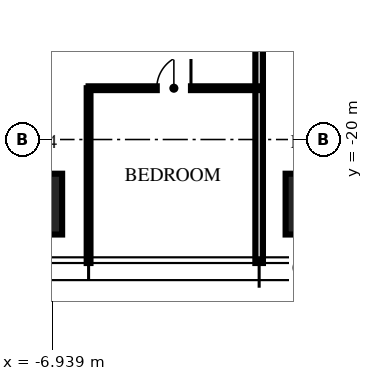
"""IFC4 building model, lengths in metres.
Left out: names, types, materials, properties, quantities, classifications, styles, units other than length and angle.
Written with IfcOpenShell. Run it as: python <this file> out.ifc"""

import sys

from ifc_helpers import new_model, si_unit, direction, frame, frame_2d, origin, origin_2d, place, context, subcontext, project, spatial, rectangle, extrude, element, fill, save


model = new_model("IFC4")
c1 = context("Model", 3, precision=1e-05, world=origin(), true_north=direction((0.0, 1.0)))
c2 = subcontext(c1, "Body", "Model", "MODEL_VIEW")
j1 = project(units=[si_unit("LENGTHUNIT", "METRE"), si_unit("PLANEANGLEUNIT", "RADIAN")], contexts=[c1])
p1 = place(None, origin())
s1 = spatial("IfcSite", under=j1, at=p1, CompositionType="ELEMENT")
p2 = place(p1, origin())
s2 = spatial("IfcBuilding", under=s1, at=p2, CompositionType="ELEMENT")
p3 = place(p2, frame((0.0, 0.0, 327.0)))
s3 = spatial("IfcBuildingStorey", under=s2, at=p3, CompositionType="ELEMENT", Elevation=327.0)
for number, where, z_axis, x_axis in (
    (1, (0.0, -21.7, 0.0), (0.0, 0.0, 1.0), (1.0, 0.0, 0.0)),
    (2, (-7.48, -21.7, 0.0), (0.0, 0.0, 1.0), (1.0, 0.0, 0.0)),
):
    element("IfcColumn", number, at=place(p3, frame(where, z_axis=z_axis, x_axis=x_axis)), inside=s3, PredefinedType="COLUMN", context=c2, shape_type="SweptSolid", body=[
        extrude(rectangle(XDim=1.6, YDim=1.6, at=origin_2d()), origin(), (0.0, 0.0, 1.0), 3.75),
    ])
p4 = place(p3, frame((-5.984, -18.65, 0.0), z_axis=(0.0, 0.0, 1.0), x_axis=(0.0, -1.0, 0.0)))
e3 = element("IfcWall", 3, at=p4, inside=s3, PredefinedType="PARTITIONING", context=c2, shape_type="SweptSolid", body=[
    extrude(rectangle(XDim=4.6, YDim=0.1, at=frame_2d((2.3, 0.0))), origin(), (0.0, 0.0, 1.0), 3.01),
])
p5 = place(p3, frame((-1.496, -12.65, 0.0), z_axis=(0.0, 0.0, 1.0), x_axis=(0.0, -1.0, 0.0)))
e4 = element("IfcWall", 4, at=p5, inside=s3, PredefinedType="PARTITIONING", context=c2, shape_type="SweptSolid", body=[
    extrude(rectangle(XDim=10.6, YDim=0.2, at=frame_2d((5.3, 0.0))), origin(), (0.0, 0.0, 1.0), 3.01),
])
p6 = place(p3, frame((-5.984, -18.65, 0.0), z_axis=(0.0, 0.0, 1.0), x_axis=(1.0, 0.0, 0.0)))
e5 = element("IfcWall", 5, at=p6, inside=s3, PredefinedType="PARTITIONING", context=c2, shape_type="SweptSolid", body=[
    extrude(rectangle(XDim=4.488, YDim=0.1, at=frame_2d((2.244, 0.0))), origin(), (0.0, 0.0, 1.0), 2.91),
])
p7 = place(p6, frame((1.794, 0.0, 0.0)))
e6 = element("IfcOpeningElement", 6, at=p7, cuts=e5, PredefinedType="OPENING", context=c2, shape_type="SweptSolid", body=[
    extrude(rectangle(XDim=0.9, YDim=2.1, at=frame_2d((0.45, 1.05))), frame((0.0, 0.06, 0.0), z_axis=(0.0, -1.0, 0.0), x_axis=(1.0, 0.0, 0.0)), (0.0, 0.0, 1.0), 0.12),
])
p8 = place(p7, origin())
e7 = element("IfcDoor", 7, at=p8, inside=s3, OperationType="SINGLE_SWING_RIGHT", PredefinedType="DOOR", context=c2, shape_type="SweptSolid", body=[
    extrude(rectangle(XDim=0.9, YDim=2.1, at=frame_2d((0.45, 1.05))), frame((0.0, 0.025, 0.0), z_axis=(0.0, -1.0, 0.0), x_axis=(1.0, 0.0, 0.0)), (0.0, 0.0, 1.0), 0.05),
])
fill(e6, e7)
save(model, sys.argv[1])
